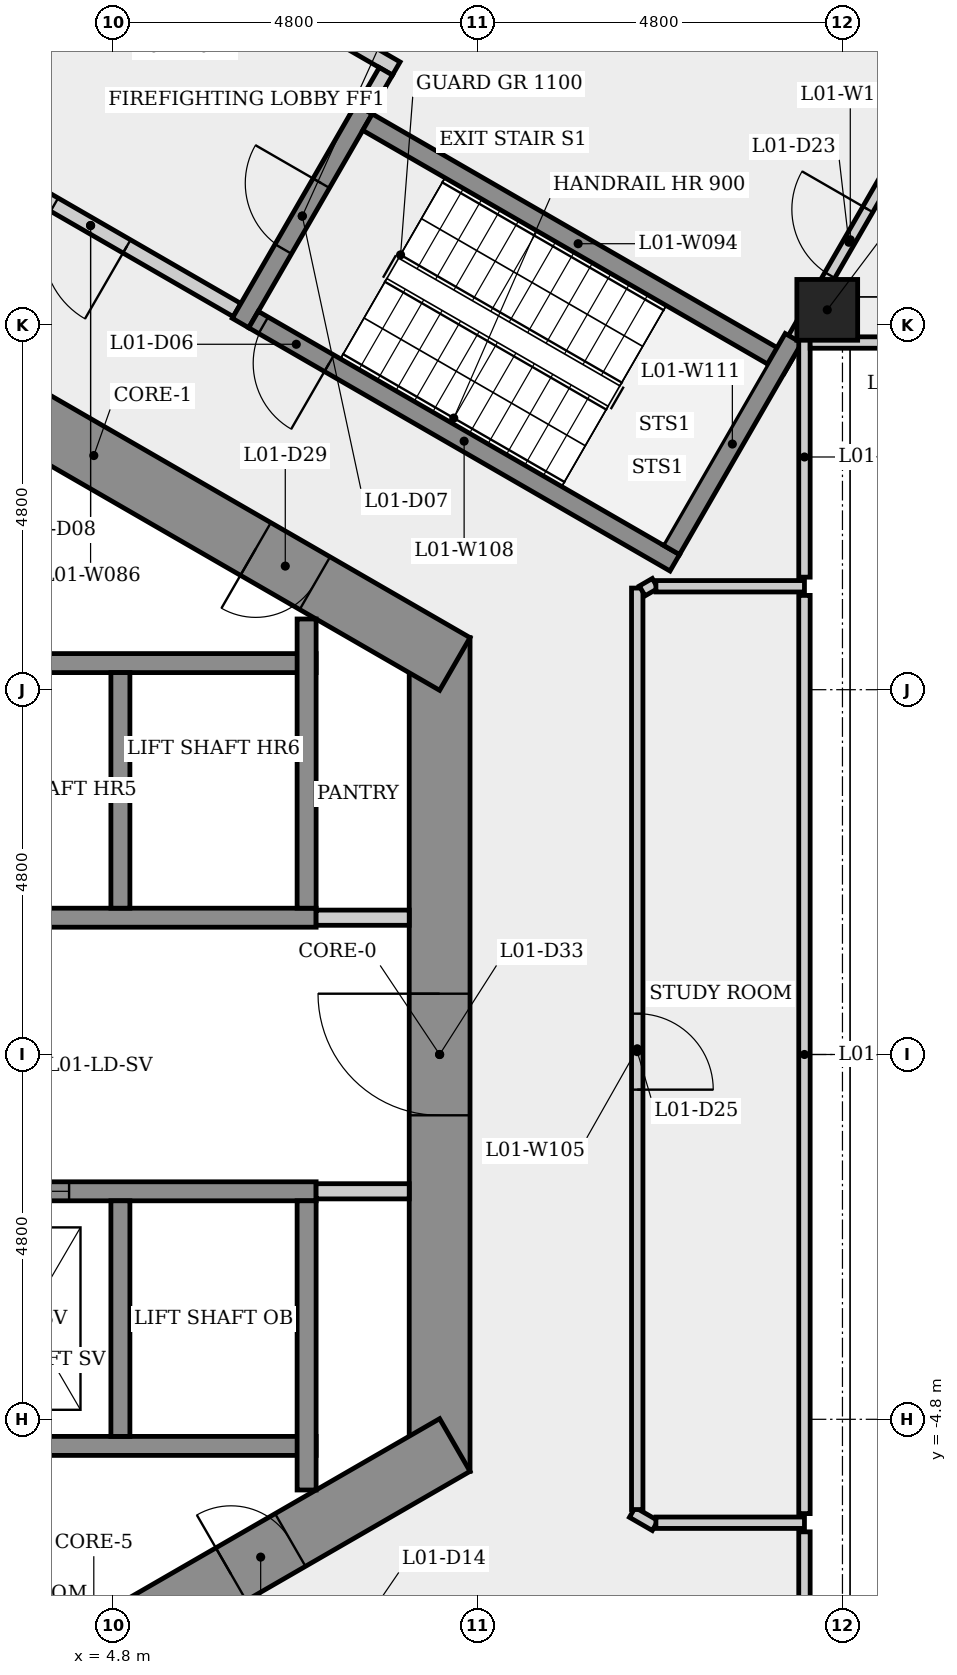
"""IFC4 building model, lengths in metres.
Left out: names, types, materials, properties, quantities, classifications, styles, units other than length and angle.
Written with IfcOpenShell. Run it as: python <this file> out.ifc"""

import sys

from ifc_helpers import new_model, si_unit, direction, frame, frame_2d, origin, origin_2d, place, context, subcontext, project, spatial, rectangle, extrude, element, fill, save


model = new_model("IFC4")
c1 = context("Model", 3, precision=1e-05, world=origin(), true_north=direction((0.0, 1.0)))
c2 = subcontext(c1, "Body", "Model", "MODEL_VIEW")
j1 = project(units=[si_unit("LENGTHUNIT", "METRE"), si_unit("PLANEANGLEUNIT", "RADIAN")], contexts=[c1])
p1 = place(None, origin())
s1 = spatial("IfcSite", under=j1, at=p1, CompositionType="ELEMENT")
p2 = place(p1, origin())
s2 = spatial("IfcBuilding", under=s1, at=p2, CompositionType="ELEMENT")
p3 = place(p2, frame((0.0, 0.0, 7.0)))
s3 = spatial("IfcBuildingStorey", under=s2, at=p3, CompositionType="ELEMENT", Elevation=7.0)
p4 = place(p3, frame((9.1, -5.485, 0.0), z_axis=(0.0, 0.0, 1.0), x_axis=(0.0, 1.0, 0.0)))
e1 = element("IfcWall", 1, at=p4, inside=s3, PredefinedType="SHEAR", context=c2, shape_type="SweptSolid", body=[
    extrude(rectangle(XDim=10.97, YDim=0.8, at=frame_2d((5.485, 0.0))), origin(), (0.0, 0.0, 1.0), 4.5),
])
p5 = place(p4, frame((4.685, 0.0, 0.0)))
e2 = element("IfcOpeningElement", 2, at=p5, cuts=e1, PredefinedType="OPENING", context=c2, shape_type="SweptSolid", body=[
    extrude(rectangle(XDim=1.6, YDim=2.1, at=frame_2d((0.8, 1.05))), frame((0.0, 0.41, 0.0), z_axis=(0.0, -1.0, 0.0), x_axis=(1.0, 0.0, 0.0)), (0.0, 0.0, 1.0), 0.82),
])
p6 = place(p3, frame((9.3, 5.138, 0.0), z_axis=(0.0, 0.0, 1.0), x_axis=(-0.866023993627, 0.500002442456, 0.0)))
e3 = element("IfcWall", 3, at=p6, inside=s3, PredefinedType="SHEAR", context=c2, shape_type="SweptSolid", body=[
    extrude(rectangle(XDim=10.97, YDim=0.8, at=frame_2d((5.485, 0.0))), origin(), (0.0, 0.0, 1.0), 4.5),
])
p7 = place(p6, frame((8.21, 0.0, 0.0)))
e4 = element("IfcOpeningElement", 4, at=p7, cuts=e3, PredefinedType="OPENING", context=c2, shape_type="SweptSolid", body=[
    extrude(rectangle(XDim=0.9, YDim=2.1, at=frame_2d((0.45, 1.05))), frame((0.0, 0.41, 0.0), z_axis=(0.0, -1.0, 0.0), x_axis=(1.0, 0.0, 0.0)), (0.0, 0.0, 1.0), 0.82),
])
p8 = place(p6, frame((2.126, 0.0, 0.0)))
e5 = element("IfcOpeningElement", 5, at=p8, cuts=e3, PredefinedType="OPENING", context=c2, shape_type="SweptSolid", body=[
    extrude(rectangle(XDim=0.9, YDim=2.1, at=frame_2d((0.45, 1.05))), frame((0.0, 0.41, 0.0), z_axis=(0.0, -1.0, 0.0), x_axis=(1.0, 0.0, 0.0)), (0.0, 0.0, 1.0), 0.82),
])
p9 = place(p3, frame((-0.2, -10.623, 0.0), z_axis=(0.0, 0.0, 1.0), x_axis=(0.866023993627, 0.500002442456, 0.0)))
e6 = element("IfcWall", 6, at=p9, inside=s3, PredefinedType="SHEAR", context=c2, shape_type="SweptSolid", body=[
    extrude(rectangle(XDim=10.97, YDim=0.8, at=frame_2d((5.485, 0.0))), origin(), (0.0, 0.0, 1.0), 4.5),
])
p10 = place(p9, frame((7.57, 0.0, 0.0)))
e7 = element("IfcOpeningElement", 7, at=p10, cuts=e6, PredefinedType="OPENING", context=c2, shape_type="SweptSolid", body=[
    extrude(rectangle(XDim=0.9, YDim=2.1, at=frame_2d((0.45, 1.05))), frame((0.0, 0.41, 0.0), z_axis=(0.0, -1.0, 0.0), x_axis=(1.0, 0.0, 0.0)), (0.0, 0.0, 1.0), 0.82),
])
p11 = place(p3, frame((14.2, 9.798, 0.0), z_axis=(0.0, 0.0, 1.0), x_axis=(1.0, 0.0, 0.0)))
e8 = element("IfcColumn", 8, at=p11, inside=s3, PredefinedType="COLUMN", context=c2, shape_type="SweptSolid", body=[
    extrude(rectangle(XDim=0.8, YDim=0.8, at=origin_2d()), origin(), (0.0, 0.0, 1.0), 4.5),
])
p12 = place(p3, frame((-7.475, 1.8, 0.0), z_axis=(0.0, 0.0, 1.0), x_axis=(1.0, 0.0, 0.0)))
e9 = element("IfcWall", 9, at=p12, inside=s3, PredefinedType="SHEAR", context=c2, shape_type="SweptSolid", body=[
    extrude(rectangle(XDim=14.95, YDim=0.25, at=frame_2d((7.475, 0.0))), origin(), (0.0, 0.0, 1.0), 4.1),
])
for number, where, z_axis, x_axis in (
    (10, (-7.225, 5.15, 0.0), (0.0, 0.0, 1.0), (1.0, 0.0, 0.0)),
    (11, (-7.225, -5.15, 0.0), (0.0, 0.0, 1.0), (1.0, 0.0, 0.0)),
):
    element("IfcWall", number, at=place(p3, frame(where, z_axis=z_axis, x_axis=x_axis)), inside=s3, PredefinedType="SHEAR", context=c2, shape_type="SweptSolid", body=[
        extrude(rectangle(XDim=14.7, YDim=0.25, at=frame_2d((7.35, 0.0))), origin(), (0.0, 0.0, 1.0), 4.1),
    ])
p13 = place(p3, frame((-7.225, -1.8, 0.0), z_axis=(0.0, 0.0, 1.0), x_axis=(1.0, 0.0, 0.0)))
e12 = element("IfcWall", 12, at=p13, inside=s3, PredefinedType="SHEAR", context=c2, shape_type="SweptSolid", body=[
    extrude(rectangle(XDim=14.7, YDim=0.25, at=frame_2d((7.35, 0.0))), origin(), (0.0, 0.0, 1.0), 4.1),
])
p14 = place(p13, frame((0.597, 0.0, 0.0)))
e13 = element("IfcOpeningElement", 13, at=p14, cuts=e12, PredefinedType="OPENING", context=c2, shape_type="SweptSolid", body=[
    extrude(rectangle(XDim=1.1, YDim=2.1, at=frame_2d((0.55, 1.05))), frame((0.0, 0.135, 0.0), z_axis=(0.0, -1.0, 0.0), x_axis=(1.0, 0.0, 0.0)), (0.0, 0.0, 1.0), 0.27),
])
p15 = place(p13, frame((3.0, 0.0, 0.0)))
e14 = element("IfcOpeningElement", 14, at=p15, cuts=e12, PredefinedType="OPENING", context=c2, shape_type="SweptSolid", body=[
    extrude(rectangle(XDim=1.1, YDim=2.1, at=frame_2d((0.55, 1.05))), frame((0.0, 0.135, 0.0), z_axis=(0.0, -1.0, 0.0), x_axis=(1.0, 0.0, 0.0)), (0.0, 0.0, 1.0), 0.27),
])
p16 = place(p13, frame((5.45, 0.0, 0.0)))
e15 = element("IfcOpeningElement", 15, at=p16, cuts=e12, PredefinedType="OPENING", context=c2, shape_type="SweptSolid", body=[
    extrude(rectangle(XDim=1.1, YDim=2.1, at=frame_2d((0.55, 1.05))), frame((0.0, 0.135, 0.0), z_axis=(0.0, -1.0, 0.0), x_axis=(1.0, 0.0, 0.0)), (0.0, 0.0, 1.0), 0.27),
])
p17 = place(p13, frame((7.9, 0.0, 0.0)))
e16 = element("IfcOpeningElement", 16, at=p17, cuts=e12, PredefinedType="OPENING", context=c2, shape_type="SweptSolid", body=[
    extrude(rectangle(XDim=1.1, YDim=2.1, at=frame_2d((0.55, 1.05))), frame((0.0, 0.135, 0.0), z_axis=(0.0, -1.0, 0.0), x_axis=(1.0, 0.0, 0.0)), (0.0, 0.0, 1.0), 0.27),
])
p18 = place(p13, frame((10.35, 0.0, 0.0)))
e17 = element("IfcOpeningElement", 17, at=p18, cuts=e12, PredefinedType="OPENING", context=c2, shape_type="SweptSolid", body=[
    extrude(rectangle(XDim=1.1, YDim=2.1, at=frame_2d((0.55, 1.05))), frame((0.0, 0.135, 0.0), z_axis=(0.0, -1.0, 0.0), x_axis=(1.0, 0.0, 0.0)), (0.0, 0.0, 1.0), 0.27),
])
p19 = place(p3, frame((4.459, 15.323, 0.0), z_axis=(0.0, 0.0, 1.0), x_axis=(0.866016039709, -0.500016218704, 0.0)))
e18 = element("IfcWall", 18, at=p19, inside=s3, PredefinedType="PARTITIONING", context=c2, shape_type="SweptSolid", body=[
    extrude(rectangle(XDim=4.7, YDim=0.2, at=frame_2d((2.35, 0.0))), origin(), (0.0, 0.0, 1.0), 4.1),
])
for number, where, z_axis, x_axis in (
    (19, (4.9, -1.925, 0.0), (0.0, 0.0, 1.0), (0.0, -1.0, 0.0)),
    (20, (4.9, 5.025, 0.0), (0.0, 0.0, 1.0), (0.0, -1.0, 0.0)),
):
    element("IfcWall", number, at=place(p3, frame(where, z_axis=z_axis, x_axis=x_axis)), inside=s3, PredefinedType="SHEAR", context=c2, shape_type="SweptSolid", body=[
        extrude(rectangle(XDim=3.1, YDim=0.25, at=frame_2d((1.55, 0.0))), origin(), (0.0, 0.0, 1.0), 4.5),
    ])
p20 = place(p3, frame((6.435, 9.795, 0.0), z_axis=(0.0, 0.0, 1.0), x_axis=(-0.866012907634, 0.500021643343, 0.0)))
e21 = element("IfcWall", 21, at=p20, inside=s3, PredefinedType="PARTITIONING", context=c2, shape_type="SweptSolid", body=[
    extrude(rectangle(XDim=4.45, YDim=0.2, at=frame_2d((2.225, 0.0))), origin(), (0.0, 0.0, 1.0), 4.1),
])
p21 = place(p20, frame((1.675, 0.0, 0.0)))
e22 = element("IfcOpeningElement", 22, at=p21, cuts=e21, PredefinedType="OPENING", context=c2, shape_type="SweptSolid", body=[
    extrude(rectangle(XDim=1.1, YDim=2.1, at=frame_2d((0.55, 1.05))), frame((0.0, 0.11, 0.0), z_axis=(0.0, -1.0, 0.0), x_axis=(1.0, 0.0, 0.0)), (0.0, 0.0, 1.0), 0.22),
])
p22 = place(p3, frame((6.48, 9.624, 0.0), z_axis=(0.0, 0.0, 1.0), x_axis=(0.500017246033, 0.866015446554, 0.0)))
e23 = element("IfcWall", 23, at=p22, inside=s3, PredefinedType="SHEAR", context=c2, shape_type="SweptSolid", body=[
    extrude(rectangle(XDim=3.25, YDim=0.25, at=frame_2d((1.625, 0.0))), origin(), (0.0, 0.0, 1.0), 4.1),
])
p23 = place(p22, frame((1.125, 0.0, 0.0)))
e24 = element("IfcOpeningElement", 24, at=p23, cuts=e23, PredefinedType="OPENING", context=c2, shape_type="SweptSolid", body=[
    extrude(rectangle(XDim=1.0, YDim=2.1, at=frame_2d((0.5, 1.05))), frame((0.0, 0.135, 0.0), z_axis=(0.0, -1.0, 0.0), x_axis=(1.0, 0.0, 0.0)), (0.0, 0.0, 1.0), 0.27),
])
p24 = place(p3, frame((7.475, 1.8, 0.0), z_axis=(0.0, 0.0, 1.0), x_axis=(1.0, 0.0, 0.0)))
e25 = element("IfcWall", 25, at=p24, inside=s3, PredefinedType="PARTITIONING", context=c2, shape_type="SweptSolid", body=[
    extrude(rectangle(XDim=1.225, YDim=0.2, at=frame_2d((0.613, 0.0))), origin(), (0.0, 0.0, 1.0), 4.1),
])
for number, where, z_axis, x_axis in (
    (26, (7.35, -1.925, 0.0), (0.0, 0.0, 1.0), (0.0, -1.0, 0.0)),
    (27, (7.35, 5.73, 0.0), (0.0, 0.0, 1.0), (0.0, -1.0, 0.0)),
):
    element("IfcWall", number, at=place(p3, frame(where, z_axis=z_axis, x_axis=x_axis)), inside=s3, PredefinedType="SHEAR", context=c2, shape_type="SweptSolid", body=[
        extrude(rectangle(XDim=3.805, YDim=0.25, at=frame_2d((1.903, 0.0))), origin(), (0.0, 0.0, 1.0), 4.1),
    ])
p25 = place(p3, frame((8.151, 12.268, 0.0), z_axis=(0.0, 0.0, 1.0), x_axis=(0.866025499775, -0.499999833739, 0.0)))
e28 = element("IfcWall", 28, at=p25, inside=s3, PredefinedType="SHEAR", context=c2, shape_type="SweptSolid", body=[
    extrude(rectangle(XDim=6.4, YDim=0.25, at=frame_2d((3.2, 0.0))), origin(), (0.0, 0.0, 1.0), 4.1),
])
p26 = place(p3, frame((8.393, 12.937, 0.0), z_axis=(0.0, 0.0, 1.0), x_axis=(-0.500065409566, -0.86598763626, 0.0)))
e29 = element("IfcWall", 29, at=p26, inside=s3, PredefinedType="PARTITIONING", context=c2, shape_type="SweptSolid", body=[
    extrude(rectangle(XDim=0.575, YDim=0.2, at=frame_2d((0.288, 0.0))), origin(), (0.0, 0.0, 1.0), 4.1),
])
p27 = place(p3, frame((8.7, -1.8, 0.0), z_axis=(0.0, 0.0, 1.0), x_axis=(-1.0, 0.0, 0.0)))
e30 = element("IfcWall", 30, at=p27, inside=s3, PredefinedType="PARTITIONING", context=c2, shape_type="SweptSolid", body=[
    extrude(rectangle(XDim=1.225, YDim=0.2, at=frame_2d((0.613, 0.0))), origin(), (0.0, 0.0, 1.0), 4.1),
])
p28 = place(p3, frame((11.635, -6.025, 0.0), z_axis=(0.0, 0.0, 1.0), x_axis=(0.866115353951, -0.499844169366, 0.0)))
e31 = element("IfcWall", 31, at=p28, inside=s3, PredefinedType="PARTITIONING", context=c2, shape_type="SweptSolid", body=[
    extrude(rectangle(XDim=0.347, YDim=0.15, at=frame_2d((0.174, 0.0))), origin(), (0.0, 0.0, 1.0), 4.1),
])
p29 = place(p3, frame((11.7, 6.137, 0.0), z_axis=(0.0, 0.0, 1.0), x_axis=(0.0, -1.0, 0.0)))
e32 = element("IfcWall", 32, at=p29, inside=s3, PredefinedType="PARTITIONING", context=c2, shape_type="SweptSolid", body=[
    extrude(rectangle(XDim=12.125, YDim=0.15, at=frame_2d((6.062, 0.0))), origin(), (0.0, 0.0, 1.0), 4.1),
])
p30 = place(p29, frame((5.6, 0.0, 0.0)))
e33 = element("IfcOpeningElement", 33, at=p30, cuts=e32, PredefinedType="OPENING", context=c2, shape_type="SweptSolid", body=[
    extrude(rectangle(XDim=1.0, YDim=2.1, at=frame_2d((0.5, 1.05))), frame((0.0, 0.085, 0.0), z_axis=(0.0, -1.0, 0.0), x_axis=(1.0, 0.0, 0.0)), (0.0, 0.0, 1.0), 0.17),
])
p31 = place(p3, frame((11.946, -6.161, 0.0), z_axis=(0.0, 0.0, 1.0), x_axis=(1.0, 0.0, 0.0)))
e34 = element("IfcWall", 34, at=p31, inside=s3, PredefinedType="PARTITIONING", context=c2, shape_type="SweptSolid", body=[
    extrude(rectangle(XDim=1.954, YDim=0.15, at=frame_2d((0.977, 0.0))), origin(), (0.0, 0.0, 1.0), 4.1),
])
p32 = place(p3, frame((11.936, 6.198, 0.0), z_axis=(0.0, 0.0, 1.0), x_axis=(-0.866103179807, -0.499865263774, 0.0)))
e35 = element("IfcWall", 35, at=p32, inside=s3, PredefinedType="PARTITIONING", context=c2, shape_type="SweptSolid", body=[
    extrude(rectangle(XDim=0.197, YDim=0.15, at=frame_2d((0.099, 0.0))), origin(), (0.0, 0.0, 1.0), 4.1),
])
p33 = place(p3, frame((12.194, 6.47, 0.0), z_axis=(0.0, 0.0, 1.0), x_axis=(-0.866025499775, 0.499999833739, 0.0)))
e36 = element("IfcWall", 36, at=p33, inside=s3, PredefinedType="SHEAR", context=c2, shape_type="SweptSolid", body=[
    extrude(rectangle(XDim=6.4, YDim=0.25, at=frame_2d((3.2, 0.0))), origin(), (0.0, 0.0, 1.0), 4.1),
])
p34 = place(p33, frame((5.25, 0.0, 0.0)))
e37 = element("IfcOpeningElement", 37, at=p34, cuts=e36, PredefinedType="OPENING", context=c2, shape_type="SweptSolid", body=[
    extrude(rectangle(XDim=1.0, YDim=2.1, at=frame_2d((0.5, 1.05))), frame((0.0, 0.135, 0.0), z_axis=(0.0, -1.0, 0.0), x_axis=(1.0, 0.0, 0.0)), (0.0, 0.0, 1.0), 0.27),
])
p35 = place(p3, frame((13.648, 9.239, 0.0), z_axis=(0.0, 0.0, 1.0), x_axis=(0.500000491645, 0.866025119933, 0.0)))
e38 = element("IfcWall", 38, at=p35, inside=s3, PredefinedType="PARTITIONING", context=c2, shape_type="SweptSolid", body=[
    extrude(rectangle(XDim=3.42, YDim=0.15, at=frame_2d((1.71, 0.0))), origin(), (0.0, 0.0, 1.0), 4.1),
])
p36 = place(p35, frame((1.173, 0.0, 0.0)))
e39 = element("IfcOpeningElement", 39, at=p36, cuts=e38, PredefinedType="OPENING", context=c2, shape_type="SweptSolid", body=[
    extrude(rectangle(XDim=1.0, YDim=2.1, at=frame_2d((0.5, 1.05))), frame((0.0, 0.085, 0.0), z_axis=(0.0, -1.0, 0.0), x_axis=(1.0, 0.0, 0.0)), (0.0, 0.0, 1.0), 0.17),
])
p37 = place(p3, frame((13.755, 9.424, 0.0), z_axis=(0.0, 0.0, 1.0), x_axis=(-0.500011789842, -0.866018596809, 0.0)))
e40 = element("IfcWall", 40, at=p37, inside=s3, PredefinedType="SHEAR", context=c2, shape_type="SweptSolid", body=[
    extrude(rectangle(XDim=3.214, YDim=0.25, at=frame_2d((1.607, 0.0))), origin(), (0.0, 0.0, 1.0), 4.1),
])
p38 = place(p3, frame((13.9, -6.281, 0.0), z_axis=(0.0, 0.0, 1.0), x_axis=(0.0, -1.0, 0.0)))
e41 = element("IfcWall", 41, at=p38, inside=s3, PredefinedType="PARTITIONING", context=c2, shape_type="SweptSolid", body=[
    extrude(rectangle(XDim=3.012, YDim=0.15, at=frame_2d((1.506, 0.0))), origin(), (0.0, 0.0, 1.0), 3.175),
])
p39 = place(p3, frame((13.9, 6.041, 0.0), z_axis=(0.0, 0.0, 1.0), x_axis=(0.0, -1.0, 0.0)))
e42 = element("IfcWall", 42, at=p39, inside=s3, PredefinedType="PARTITIONING", context=c2, shape_type="SweptSolid", body=[
    extrude(rectangle(XDim=12.082, YDim=0.15, at=frame_2d((6.041, 0.0))), origin(), (0.0, 0.0, 1.0), 3.175),
])
p40 = place(p3, frame((13.9, 6.161, 0.0), z_axis=(0.0, 0.0, 1.0), x_axis=(-1.0, 0.0, 0.0)))
e43 = element("IfcWall", 43, at=p40, inside=s3, PredefinedType="PARTITIONING", context=c2, shape_type="SweptSolid", body=[
    extrude(rectangle(XDim=1.954, YDim=0.15, at=frame_2d((0.977, 0.0))), origin(), (0.0, 0.0, 1.0), 4.1),
])
p41 = place(p3, frame((13.9, 9.443, 0.0), z_axis=(0.0, 0.0, 1.0), x_axis=(0.0, -1.0, 0.0)))
e44 = element("IfcWall", 44, at=p41, inside=s3, PredefinedType="PARTITIONING", context=c2, shape_type="SweptSolid", body=[
    extrude(rectangle(XDim=3.162, YDim=0.15, at=frame_2d((1.581, 0.0))), origin(), (0.0, 0.0, 1.0), 3.175),
])
p42 = place(p3, frame((16.78, 9.368, 0.0), z_axis=(0.0, 0.0, 1.0), x_axis=(-1.0, 0.0, 0.0)))
e45 = element("IfcWall", 45, at=p42, inside=s3, PredefinedType="PARTITIONING", context=c2, shape_type="SweptSolid", body=[
    extrude(rectangle(XDim=2.805, YDim=0.15, at=frame_2d((1.402, 0.0))), origin(), (0.0, 0.0, 1.0), 3.175),
])
p43 = place(p18, origin())
e46 = element("IfcDoor", 46, at=p43, inside=s3, OperationType="SLIDING_TO_LEFT", PredefinedType="DOOR", context=c2, shape_type="SweptSolid", body=[
    extrude(rectangle(XDim=1.1, YDim=2.1, at=frame_2d((0.55, 1.05))), frame((0.0, 0.025, 0.0), z_axis=(0.0, -1.0, 0.0), x_axis=(1.0, 0.0, 0.0)), (0.0, 0.0, 1.0), 0.05),
])
fill(e17, e46)
p44 = place(p34, origin())
e47 = element("IfcDoor", 47, at=p44, inside=s3, OperationType="SINGLE_SWING_LEFT", PredefinedType="DOOR", context=c2, shape_type="SweptSolid", body=[
    extrude(rectangle(XDim=1.0, YDim=2.1, at=frame_2d((0.5, 1.05))), frame((0.0, 0.025, 0.0), z_axis=(0.0, -1.0, 0.0), x_axis=(1.0, 0.0, 0.0)), (0.0, 0.0, 1.0), 0.05),
])
fill(e37, e47)
p45 = place(p23, origin())
e48 = element("IfcDoor", 48, at=p45, inside=s3, OperationType="SINGLE_SWING_RIGHT", PredefinedType="DOOR", context=c2, shape_type="SweptSolid", body=[
    extrude(rectangle(XDim=1.0, YDim=2.1, at=frame_2d((0.5, 1.05))), frame((0.0, 0.025, 0.0), z_axis=(0.0, -1.0, 0.0), x_axis=(1.0, 0.0, 0.0)), (0.0, 0.0, 1.0), 0.05),
])
fill(e24, e48)
p46 = place(p21, origin())
e49 = element("IfcDoor", 49, at=p46, inside=s3, OperationType="SINGLE_SWING_LEFT", PredefinedType="DOOR", context=c2, shape_type="SweptSolid", body=[
    extrude(rectangle(XDim=1.1, YDim=2.1, at=frame_2d((0.55, 1.05))), frame((0.0, 0.025, 0.0), z_axis=(0.0, -1.0, 0.0), x_axis=(1.0, 0.0, 0.0)), (0.0, 0.0, 1.0), 0.05),
])
fill(e22, e49)
p47 = place(p36, origin())
e50 = element("IfcDoor", 50, at=p47, inside=s3, OperationType="SINGLE_SWING_RIGHT", PredefinedType="DOOR", context=c2, shape_type="SweptSolid", body=[
    extrude(rectangle(XDim=1.0, YDim=2.1, at=frame_2d((0.5, 1.05))), frame((0.0, 0.025, 0.0), z_axis=(0.0, -1.0, 0.0), x_axis=(1.0, 0.0, 0.0)), (0.0, 0.0, 1.0), 0.05),
])
fill(e39, e50)
p48 = place(p30, origin())
e51 = element("IfcDoor", 51, at=p48, inside=s3, OperationType="SINGLE_SWING_RIGHT", PredefinedType="DOOR", context=c2, shape_type="SweptSolid", body=[
    extrude(rectangle(XDim=1.0, YDim=2.1, at=frame_2d((0.5, 1.05))), frame((0.0, 0.025, 0.0), z_axis=(0.0, -1.0, 0.0), x_axis=(1.0, 0.0, 0.0)), (0.0, 0.0, 1.0), 0.05),
])
fill(e33, e51)
p49 = place(p8, origin())
e52 = element("IfcDoor", 52, at=p49, inside=s3, OperationType="SINGLE_SWING_RIGHT", PredefinedType="DOOR", context=c2, shape_type="SweptSolid", body=[
    extrude(rectangle(XDim=0.9, YDim=2.1, at=frame_2d((0.45, 1.05))), frame((0.0, 0.025, 0.0), z_axis=(0.0, -1.0, 0.0), x_axis=(1.0, 0.0, 0.0)), (0.0, 0.0, 1.0), 0.05),
])
fill(e5, e52)
p50 = place(p10, origin())
e53 = element("IfcDoor", 53, at=p50, inside=s3, OperationType="SINGLE_SWING_LEFT", PredefinedType="DOOR", context=c2, shape_type="SweptSolid", body=[
    extrude(rectangle(XDim=0.9, YDim=2.1, at=frame_2d((0.45, 1.05))), frame((0.0, 0.025, 0.0), z_axis=(0.0, -1.0, 0.0), x_axis=(1.0, 0.0, 0.0)), (0.0, 0.0, 1.0), 0.05),
])
fill(e7, e53)
p51 = place(p5, origin())
e54 = element("IfcDoor", 54, at=p51, inside=s3, OperationType="SINGLE_SWING_RIGHT", PredefinedType="DOOR", context=c2, shape_type="SweptSolid", body=[
    extrude(rectangle(XDim=1.6, YDim=2.1, at=frame_2d((0.8, 1.05))), frame((0.0, 0.025, 0.0), z_axis=(0.0, -1.0, 0.0), x_axis=(1.0, 0.0, 0.0)), (0.0, 0.0, 1.0), 0.05),
])
fill(e2, e54)
save(model, sys.argv[1])
